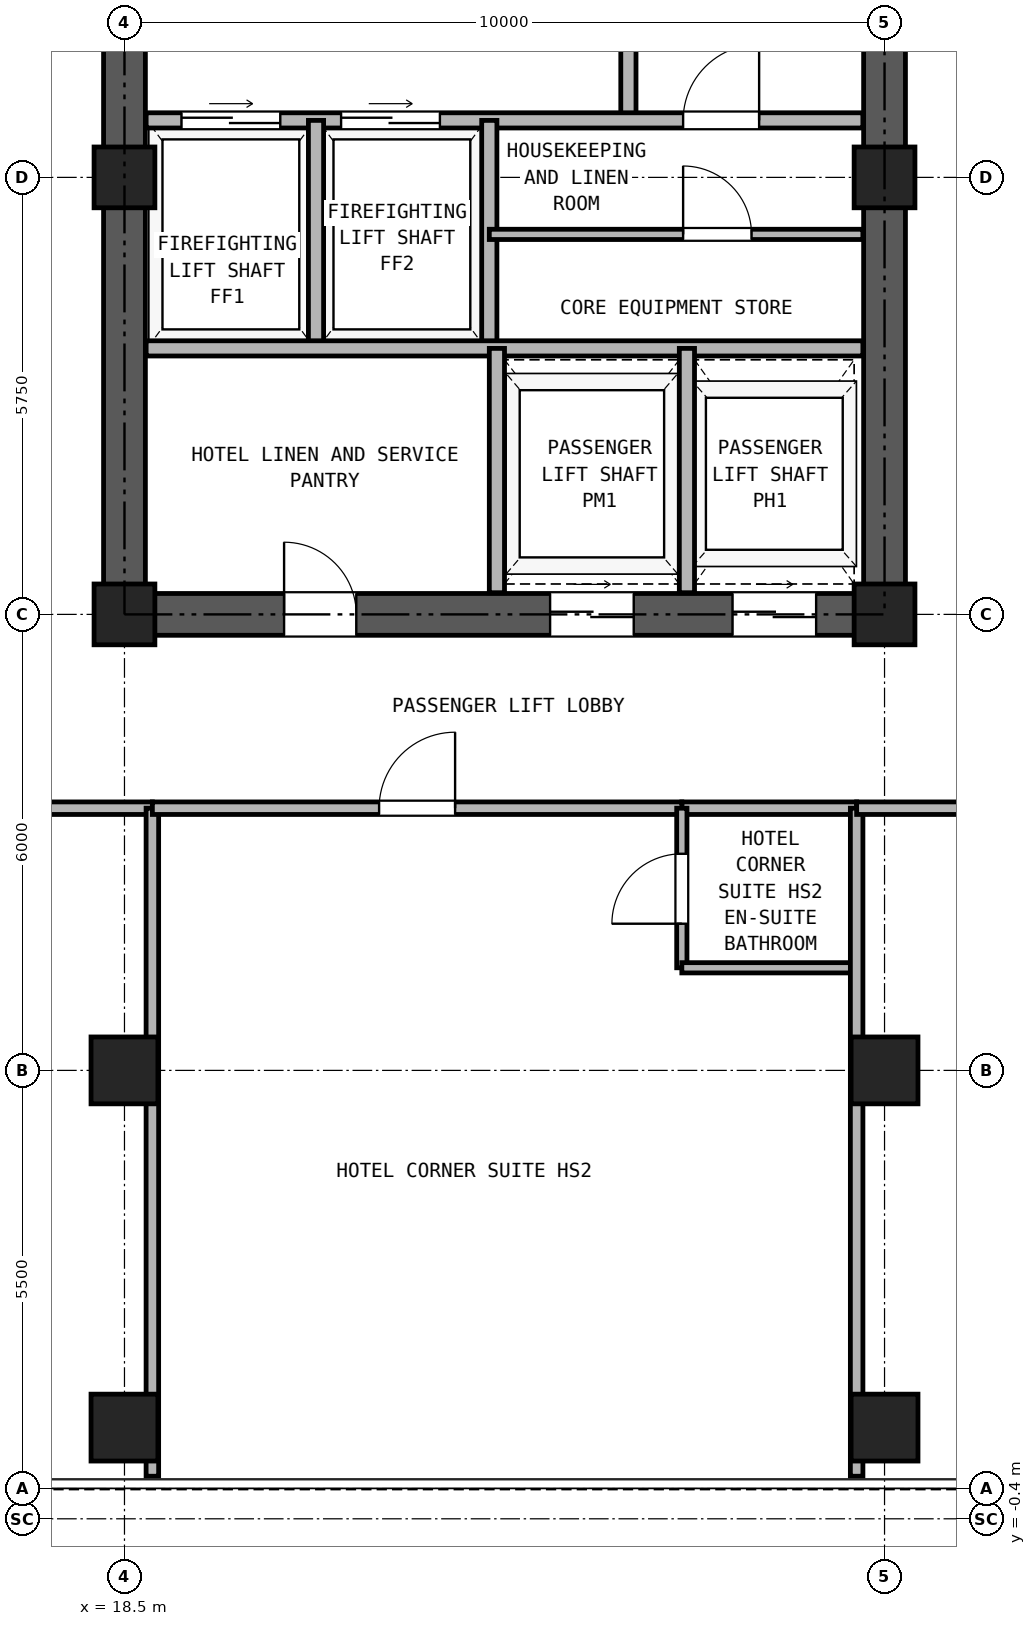
"""IFC4 building model, lengths in metres.
Left out: names, types, materials, properties, quantities, classifications, styles, units other than length and angle.
Written with IfcOpenShell. Run it as: python <this file> out.ifc"""

import sys

from ifc_helpers import new_model, si_unit, direction, frame, frame_2d, origin, origin_2d, place, context, subcontext, project, spatial, rectangle, hollow_rectangle, extrude, source, transform, mapped, element, fill, save


model = new_model("IFC4")
c1 = context("Model", 3, precision=1e-05, world=origin(), true_north=direction((0.0, 1.0)))
c2 = subcontext(c1, "Body", "Model", "MODEL_VIEW")
j1 = project(units=[si_unit("LENGTHUNIT", "METRE"), si_unit("PLANEANGLEUNIT", "RADIAN")], contexts=[c1])
p1 = place(None, origin())
s1 = spatial("IfcSite", under=j1, at=p1, CompositionType="ELEMENT")
p2 = place(p1, origin())
s2 = spatial("IfcBuilding", under=s1, at=p2, CompositionType="ELEMENT")
p3 = place(p2, frame((0.0, 0.0, 124.7)))
s3 = spatial("IfcBuildingStorey", under=s2, at=p3, CompositionType="ELEMENT", Elevation=124.7)
m1 = source(origin(), c2, "Body", "SweptSolid", [
    extrude(hollow_rectangle(XDim=0.88, YDim=0.88, WallThickness=0.05, at=origin_2d()), origin(), (0.0, 0.0, 1.0), 2.95),
])
for number, where, z_axis, x_axis in (
    (1, (18.5, 0.8, 0.0), (0.0, 0.0, 1.0), (1.0, 0.0, 0.0)),
    (2, (28.5, 0.8, 0.0), (0.0, 0.0, 1.0), (1.0, 0.0, 0.0)),
    (3, (18.5, 5.5, 0.0), (0.0, 0.0, 1.0), (1.0, 0.0, 0.0)),
):
    element("IfcColumn", number, at=place(p3, frame(where, z_axis=z_axis, x_axis=x_axis)), inside=s3, PredefinedType="COLUMN", context=c2, shape_type="MappedRepresentation", body=[
        mapped(m1, transform((0.0, 0.0, 0.0), x_axis=(1.0, 0.0, 0.0), y_axis=(0.0, 1.0, 0.0), z_axis=(0.0, 0.0, 1.0), scale=1.0)),
    ])
m2 = source(origin(), c2, "Body", "SweptSolid", [
    extrude(hollow_rectangle(XDim=0.8, YDim=0.8, WallThickness=0.045, at=origin_2d()), origin(), (0.0, 0.0, 1.0), 2.95),
])
for number, where, z_axis, x_axis in (
    (4, (18.5, 11.5, 0.0), (0.0, 0.0, 1.0), (1.0, 0.0, 0.0)),
    (5, (18.5, 17.25, 0.0), (0.0, 0.0, 1.0), (1.0, 0.0, 0.0)),
):
    element("IfcColumn", number, at=place(p3, frame(where, z_axis=z_axis, x_axis=x_axis)), inside=s3, PredefinedType="COLUMN", context=c2, shape_type="MappedRepresentation", body=[
        mapped(m2, transform((0.0, 0.0, 0.0), x_axis=(1.0, 0.0, 0.0), y_axis=(0.0, 1.0, 0.0), z_axis=(0.0, 0.0, 1.0), scale=1.0)),
    ])
p4 = place(p3, frame((28.5, 5.5, 0.0), z_axis=(0.0, 0.0, 1.0), x_axis=(1.0, 0.0, 0.0)))
e6 = element("IfcColumn", 6, at=p4, inside=s3, PredefinedType="COLUMN", context=c2, shape_type="MappedRepresentation", body=[
    mapped(m1, transform((0.0, 0.0, 0.0), x_axis=(1.0, 0.0, 0.0), y_axis=(0.0, 1.0, 0.0), z_axis=(0.0, 0.0, 1.0), scale=1.0)),
])
for number, where, z_axis, x_axis in (
    (7, (28.5, 11.5, 0.0), (0.0, 0.0, 1.0), (1.0, 0.0, 0.0)),
    (8, (28.5, 17.25, 0.0), (0.0, 0.0, 1.0), (1.0, 0.0, 0.0)),
):
    element("IfcColumn", number, at=place(p3, frame(where, z_axis=z_axis, x_axis=x_axis)), inside=s3, PredefinedType="COLUMN", context=c2, shape_type="MappedRepresentation", body=[
        mapped(m2, transform((0.0, 0.0, 0.0), x_axis=(1.0, 0.0, 0.0), y_axis=(0.0, 1.0, 0.0), z_axis=(0.0, 0.0, 1.0), scale=1.0)),
    ])
p5 = place(p3, frame((18.225, 11.5, 0.0), z_axis=(0.0, 0.0, 1.0), x_axis=(1.0, 0.0, 0.0)))
e9 = element("IfcWall", 9, at=p5, inside=s3, PredefinedType="SHEAR", context=c2, shape_type="SweptSolid", body=[
    extrude(rectangle(XDim=10.55, YDim=0.55, at=frame_2d((5.275, 0.0))), origin(), (0.0, 0.0, 1.0), 2.95),
])
p6 = place(p5, frame((2.375, 0.0, 0.0)))
e10 = element("IfcOpeningElement", 10, at=p6, cuts=e9, PredefinedType="OPENING", context=c2, shape_type="SweptSolid", body=[
    extrude(rectangle(XDim=0.95, YDim=2.15, at=frame_2d((0.475, 1.075))), frame((0.0, 0.285, 0.0), z_axis=(0.0, -1.0, 0.0), x_axis=(1.0, 0.0, 0.0)), (0.0, 0.0, 1.0), 0.57),
])
p7 = place(p5, frame((5.875, 0.0, 0.0)))
e11 = element("IfcOpeningElement", 11, at=p7, cuts=e9, PredefinedType="OPENING", context=c2, shape_type="SweptSolid", body=[
    extrude(rectangle(XDim=1.1, YDim=2.25, at=frame_2d((0.55, 1.125))), frame((0.0, 0.285, 0.0), z_axis=(0.0, -1.0, 0.0), x_axis=(1.0, 0.0, 0.0)), (0.0, 0.0, 1.0), 0.57),
])
p8 = place(p5, frame((8.275, 0.0, 0.0)))
e12 = element("IfcOpeningElement", 12, at=p8, cuts=e9, PredefinedType="OPENING", context=c2, shape_type="SweptSolid", body=[
    extrude(rectangle(XDim=1.1, YDim=2.25, at=frame_2d((0.55, 1.125))), frame((0.0, 0.285, 0.0), z_axis=(0.0, -1.0, 0.0), x_axis=(1.0, 0.0, 0.0)), (0.0, 0.0, 1.0), 0.57),
])
p9 = place(p3, frame((18.5, 11.775, 0.0), z_axis=(0.0, 0.0, 1.0), x_axis=(0.0, 1.0, 0.0)))
e13 = element("IfcWall", 13, at=p9, inside=s3, PredefinedType="SHEAR", context=c2, shape_type="SweptSolid", body=[
    extrude(rectangle(XDim=16.7, YDim=0.55, at=frame_2d((8.35, 0.0))), origin(), (0.0, 0.0, 1.0), 2.95),
])
p10 = place(p9, frame((7.375, 0.0, 0.0)))
e14 = element("IfcOpeningElement", 14, at=p10, cuts=e13, PredefinedType="OPENING", context=c2, shape_type="SweptSolid", body=[
    extrude(rectangle(XDim=1.15, YDim=2.2, at=frame_2d((0.575, 1.1))), frame((0.0, 0.285, 0.0), z_axis=(0.0, -1.0, 0.0), x_axis=(1.0, 0.0, 0.0)), (0.0, 0.0, 1.0), 0.57),
])
p11 = place(p3, frame((28.5, 11.775, 0.0), z_axis=(0.0, 0.0, 1.0), x_axis=(0.0, 1.0, 0.0)))
e15 = element("IfcWall", 15, at=p11, inside=s3, PredefinedType="SHEAR", context=c2, shape_type="SweptSolid", body=[
    extrude(rectangle(XDim=16.7, YDim=0.55, at=frame_2d((8.35, 0.0))), origin(), (0.0, 0.0, 1.0), 2.95),
])
p12 = place(p11, frame((7.375, 0.0, 0.0)))
e16 = element("IfcOpeningElement", 16, at=p12, cuts=e15, PredefinedType="OPENING", context=c2, shape_type="SweptSolid", body=[
    extrude(rectangle(XDim=1.15, YDim=2.2, at=frame_2d((0.575, 1.1))), frame((0.0, 0.285, 0.0), z_axis=(0.0, -1.0, 0.0), x_axis=(1.0, 0.0, 0.0)), (0.0, 0.0, 1.0), 0.57),
])
p13 = place(p3, frame((25.13, 18.0, 0.0), z_axis=(0.0, 0.0, 1.0), x_axis=(0.0, 1.0, 0.0)))
e17 = element("IfcWall", 17, at=p13, inside=s3, PredefinedType="PARTITIONING", context=c2, shape_type="SweptSolid", body=[
    extrude(rectangle(XDim=3.39, YDim=0.2, at=frame_2d((1.695, 0.0))), origin(), (0.0, 0.0, 1.0), 2.95),
])
p14 = place(p13, frame((1.1, 0.0, 0.0)))
e18 = element("IfcOpeningElement", 18, at=p14, cuts=e17, PredefinedType="OPENING", context=c2, shape_type="SweptSolid", body=[
    extrude(rectangle(XDim=1.15, YDim=2.2, at=frame_2d((0.575, 1.1))), frame((0.0, 0.11, 0.0), z_axis=(0.0, -1.0, 0.0), x_axis=(1.0, 0.0, 0.0)), (0.0, 0.0, 1.0), 0.22),
])
p15 = place(p3, frame((18.785, 18.0, 0.0), z_axis=(0.0, 0.0, 1.0), x_axis=(1.0, 0.0, 0.0)))
e19 = element("IfcWall", 19, at=p15, inside=s3, PredefinedType="PARTITIONING", context=c2, shape_type="SweptSolid", body=[
    extrude(rectangle(XDim=9.43, YDim=0.2, at=frame_2d((4.715, 0.0))), origin(), (0.0, 0.0, 1.0), 2.95),
])
p16 = place(p15, frame((0.465, 0.0, 0.0)))
e20 = element("IfcOpeningElement", 20, at=p16, cuts=e19, PredefinedType="OPENING", context=c2, shape_type="SweptSolid", body=[
    extrude(rectangle(XDim=1.3, YDim=2.3, at=frame_2d((0.65, 1.15))), frame((0.0, 0.11, 0.0), z_axis=(0.0, -1.0, 0.0), x_axis=(1.0, 0.0, 0.0)), (0.0, 0.0, 1.0), 0.22),
])
p17 = place(p15, frame((2.565, 0.0, 0.0)))
e21 = element("IfcOpeningElement", 21, at=p17, cuts=e19, PredefinedType="OPENING", context=c2, shape_type="SweptSolid", body=[
    extrude(rectangle(XDim=1.3, YDim=2.3, at=frame_2d((0.65, 1.15))), frame((0.0, 0.11, 0.0), z_axis=(0.0, -1.0, 0.0), x_axis=(1.0, 0.0, 0.0)), (0.0, 0.0, 1.0), 0.22),
])
p18 = place(p15, frame((7.065, 0.0, 0.0)))
e22 = element("IfcOpeningElement", 22, at=p18, cuts=e19, PredefinedType="OPENING", context=c2, shape_type="SweptSolid", body=[
    extrude(rectangle(XDim=1.0, YDim=2.15, at=frame_2d((0.5, 1.075))), frame((0.0, 0.11, 0.0), z_axis=(0.0, -1.0, 0.0), x_axis=(1.0, 0.0, 0.0)), (0.0, 0.0, 1.0), 0.22),
])
for number, where, z_axis, x_axis in (
    (23, (21.02, 15.0, 0.0), (0.0, 0.0, 1.0), (0.0, 1.0, 0.0)),
    (24, (23.3, 15.0, 0.0), (0.0, 0.0, 1.0), (0.0, 1.0, 0.0)),
):
    element("IfcWall", number, at=place(p3, frame(where, z_axis=z_axis, x_axis=x_axis)), inside=s3, PredefinedType="PARTITIONING", context=c2, shape_type="SweptSolid", body=[
        extrude(rectangle(XDim=3.0, YDim=0.2, at=frame_2d((1.5, 0.0))), origin(), (0.0, 0.0, 1.0), 2.95),
    ])
p19 = place(p3, frame((18.785, 15.0, 0.0), z_axis=(0.0, 0.0, 1.0), x_axis=(1.0, 0.0, 0.0)))
e25 = element("IfcWall", 25, at=p19, inside=s3, PredefinedType="PARTITIONING", context=c2, shape_type="SweptSolid", body=[
    extrude(rectangle(XDim=9.43, YDim=0.2, at=frame_2d((4.715, 0.0))), origin(), (0.0, 0.0, 1.0), 2.95),
])
p20 = place(p3, frame((23.3, 16.5, 0.0), z_axis=(0.0, 0.0, 1.0), x_axis=(1.0, 0.0, 0.0)))
e26 = element("IfcWall", 26, at=p20, inside=s3, PredefinedType="PARTITIONING", context=c2, shape_type="SweptSolid", body=[
    extrude(rectangle(XDim=4.915, YDim=0.135, at=frame_2d((2.458, 0.0))), origin(), (0.0, 0.0, 1.0), 2.95),
])
p21 = place(p20, frame((2.55, 0.0, 0.0)))
e27 = element("IfcOpeningElement", 27, at=p21, cuts=e26, PredefinedType="OPENING", context=c2, shape_type="SweptSolid", body=[
    extrude(rectangle(XDim=0.9, YDim=2.05, at=frame_2d((0.45, 1.025))), frame((0.0, 0.077, 0.0), z_axis=(0.0, -1.0, 0.0), x_axis=(1.0, 0.0, 0.0)), (0.0, 0.0, 1.0), 0.155),
])
for number, where, z_axis, x_axis in (
    (28, (23.4, 11.785, 0.0), (0.0, 0.0, 1.0), (0.0, 1.0, 0.0)),
    (29, (25.9, 11.785, 0.0), (0.0, 0.0, 1.0), (0.0, 1.0, 0.0)),
):
    element("IfcWall", number, at=place(p3, frame(where, z_axis=z_axis, x_axis=x_axis)), inside=s3, PredefinedType="PARTITIONING", context=c2, shape_type="SweptSolid", body=[
        extrude(rectangle(XDim=3.215, YDim=0.2, at=frame_2d((1.607, 0.0))), origin(), (0.0, 0.0, 1.0), 2.95),
    ])
p22 = place(p3, frame((11.9, 8.95, 0.0), z_axis=(0.0, 0.0, 1.0), x_axis=(1.0, 0.0, 0.0)))
e30 = element("IfcWall", 30, at=p22, inside=s3, PredefinedType="PARTITIONING", context=c2, shape_type="SweptSolid", body=[
    extrude(rectangle(XDim=6.967, YDim=0.165, at=frame_2d((3.483, 0.0))), origin(), (0.0, 0.0, 1.0), 2.95),
])
p23 = place(p22, frame((2.983, 0.0, 0.0)))
e31 = element("IfcOpeningElement", 31, at=p23, cuts=e30, PredefinedType="OPENING", context=c2, shape_type="SweptSolid", body=[
    extrude(rectangle(XDim=1.0, YDim=2.15, at=frame_2d((0.5, 1.075))), frame((0.0, 0.093, 0.0), z_axis=(0.0, -1.0, 0.0), x_axis=(1.0, 0.0, 0.0)), (0.0, 0.0, 1.0), 0.185),
])
p24 = place(p3, frame((18.867, 0.16, 0.0), z_axis=(0.0, 0.0, 1.0), x_axis=(0.0, 1.0, 0.0)))
e32 = element("IfcWall", 32, at=p24, inside=s3, PredefinedType="PARTITIONING", context=c2, shape_type="SweptSolid", body=[
    extrude(rectangle(XDim=8.79, YDim=0.165, at=frame_2d((4.395, 0.0))), origin(), (0.0, 0.0, 1.0), 2.95),
])
p25 = place(p3, frame((25.833, 8.95, 0.0), z_axis=(0.0, 0.0, 1.0), x_axis=(1.0, 0.0, 0.0)))
e33 = element("IfcWall", 33, at=p25, inside=s3, PredefinedType="PARTITIONING", context=c2, shape_type="SweptSolid", body=[
    extrude(rectangle(XDim=2.3, YDim=0.165, at=frame_2d((1.15, 0.0))), origin(), (0.0, 0.0, 1.0), 2.95),
])
p26 = place(p3, frame((18.867, 8.95, 0.0), z_axis=(0.0, 0.0, 1.0), x_axis=(1.0, 0.0, 0.0)))
e34 = element("IfcWall", 34, at=p26, inside=s3, PredefinedType="PARTITIONING", context=c2, shape_type="SweptSolid", body=[
    extrude(rectangle(XDim=6.966, YDim=0.165, at=frame_2d((3.483, 0.0))), origin(), (0.0, 0.0, 1.0), 2.95),
])
p27 = place(p26, frame((2.983, 0.0, 0.0)))
e35 = element("IfcOpeningElement", 35, at=p27, cuts=e34, PredefinedType="OPENING", context=c2, shape_type="SweptSolid", body=[
    extrude(rectangle(XDim=1.0, YDim=2.15, at=frame_2d((0.5, 1.075))), frame((0.0, 0.093, 0.0), z_axis=(0.0, -1.0, 0.0), x_axis=(1.0, 0.0, 0.0)), (0.0, 0.0, 1.0), 0.185),
])
p28 = place(p3, frame((25.833, 6.85, 0.0), z_axis=(0.0, 0.0, 1.0), x_axis=(0.0, 1.0, 0.0)))
e36 = element("IfcWall", 36, at=p28, inside=s3, PredefinedType="PARTITIONING", context=c2, shape_type="SweptSolid", body=[
    extrude(rectangle(XDim=2.1, YDim=0.135, at=frame_2d((1.05, 0.0))), origin(), (0.0, 0.0, 1.0), 2.95),
])
p29 = place(p28, frame((0.58, 0.0, 0.0)))
e37 = element("IfcOpeningElement", 37, at=p29, cuts=e36, PredefinedType="OPENING", context=c2, shape_type="SweptSolid", body=[
    extrude(rectangle(XDim=0.92, YDim=2.1, at=frame_2d((0.46, 1.05))), frame((0.0, 0.077, 0.0), z_axis=(0.0, -1.0, 0.0), x_axis=(1.0, 0.0, 0.0)), (0.0, 0.0, 1.0), 0.155),
])
p30 = place(p3, frame((25.833, 6.85, 0.0), z_axis=(0.0, 0.0, 1.0), x_axis=(1.0, 0.0, 0.0)))
e38 = element("IfcWall", 38, at=p30, inside=s3, PredefinedType="PARTITIONING", context=c2, shape_type="SweptSolid", body=[
    extrude(rectangle(XDim=2.3, YDim=0.135, at=frame_2d((1.15, 0.0))), origin(), (0.0, 0.0, 1.0), 2.95),
])
p31 = place(p3, frame((28.133, 0.16, 0.0), z_axis=(0.0, 0.0, 1.0), x_axis=(0.0, 1.0, 0.0)))
e39 = element("IfcWall", 39, at=p31, inside=s3, PredefinedType="PARTITIONING", context=c2, shape_type="SweptSolid", body=[
    extrude(rectangle(XDim=8.79, YDim=0.165, at=frame_2d((4.395, 0.0))), origin(), (0.0, 0.0, 1.0), 2.95),
])
p32 = place(p3, frame((28.133, 8.95, 0.0), z_axis=(0.0, 0.0, 1.0), x_axis=(1.0, 0.0, 0.0)))
e40 = element("IfcWall", 40, at=p32, inside=s3, PredefinedType="PARTITIONING", context=c2, shape_type="SweptSolid", body=[
    extrude(rectangle(XDim=6.967, YDim=0.165, at=frame_2d((3.483, 0.0))), origin(), (0.0, 0.0, 1.0), 2.95),
])
p33 = place(p32, frame((2.984, 0.0, 0.0)))
e41 = element("IfcOpeningElement", 41, at=p33, cuts=e40, PredefinedType="OPENING", context=c2, shape_type="SweptSolid", body=[
    extrude(rectangle(XDim=1.0, YDim=2.15, at=frame_2d((0.5, 1.075))), frame((0.0, 0.093, 0.0), z_axis=(0.0, -1.0, 0.0), x_axis=(1.0, 0.0, 0.0)), (0.0, 0.0, 1.0), 0.185),
])
p34 = place(p16, origin())
e42 = element("IfcDoor", 42, at=p34, inside=s3, OperationType="DOUBLE_DOOR_SLIDING", PredefinedType="DOOR", context=c2, shape_type="SweptSolid", body=[
    extrude(rectangle(XDim=1.3, YDim=2.3, at=frame_2d((0.65, 1.15))), frame((0.0, 0.025, 0.0), z_axis=(0.0, -1.0, 0.0), x_axis=(1.0, 0.0, 0.0)), (0.0, 0.0, 1.0), 0.05),
])
fill(e20, e42)
p35 = place(p17, origin())
e43 = element("IfcDoor", 43, at=p35, inside=s3, OperationType="DOUBLE_DOOR_SLIDING", PredefinedType="DOOR", context=c2, shape_type="SweptSolid", body=[
    extrude(rectangle(XDim=1.3, YDim=2.3, at=frame_2d((0.65, 1.15))), frame((0.0, 0.025, 0.0), z_axis=(0.0, -1.0, 0.0), x_axis=(1.0, 0.0, 0.0)), (0.0, 0.0, 1.0), 0.05),
])
fill(e21, e43)
p36 = place(p18, frame((1.0, 0.0, 0.0), z_axis=(0.0, 0.0, 1.0), x_axis=(-1.0, 0.0, 0.0)))
e44 = element("IfcDoor", 44, at=p36, inside=s3, OperationType="SINGLE_SWING_RIGHT", PredefinedType="DOOR", context=c2, shape_type="SweptSolid", body=[
    extrude(rectangle(XDim=1.0, YDim=2.15, at=frame_2d((0.5, 1.075))), frame((0.0, 0.025, 0.0), z_axis=(0.0, -1.0, 0.0), x_axis=(1.0, 0.0, 0.0)), (0.0, 0.0, 1.0), 0.05),
])
fill(e22, e44)
p37 = place(p21, frame((0.9, 0.0, 0.0), z_axis=(0.0, 0.0, 1.0), x_axis=(-1.0, 0.0, 0.0)))
e45 = element("IfcDoor", 45, at=p37, inside=s3, OperationType="SINGLE_SWING_LEFT", PredefinedType="DOOR", context=c2, shape_type="SweptSolid", body=[
    extrude(rectangle(XDim=0.9, YDim=2.05, at=frame_2d((0.45, 1.025))), frame((0.0, 0.025, 0.0), z_axis=(0.0, -1.0, 0.0), x_axis=(1.0, 0.0, 0.0)), (0.0, 0.0, 1.0), 0.05),
])
fill(e27, e45)
p38 = place(p6, frame((0.95, 0.0, 0.0), z_axis=(0.0, 0.0, 1.0), x_axis=(-1.0, 0.0, 0.0)))
e46 = element("IfcDoor", 46, at=p38, inside=s3, OperationType="SINGLE_SWING_LEFT", PredefinedType="DOOR", context=c2, shape_type="SweptSolid", body=[
    extrude(rectangle(XDim=0.95, YDim=2.15, at=frame_2d((0.475, 1.075))), frame((0.0, 0.025, 0.0), z_axis=(0.0, -1.0, 0.0), x_axis=(1.0, 0.0, 0.0)), (0.0, 0.0, 1.0), 0.05),
])
fill(e10, e46)
p39 = place(p7, frame((1.1, 0.0, 0.0), z_axis=(0.0, 0.0, 1.0), x_axis=(-1.0, 0.0, 0.0)))
e47 = element("IfcDoor", 47, at=p39, inside=s3, OperationType="DOUBLE_DOOR_SLIDING", PredefinedType="DOOR", context=c2, shape_type="SweptSolid", body=[
    extrude(rectangle(XDim=1.1, YDim=2.25, at=frame_2d((0.55, 1.125))), frame((0.0, 0.025, 0.0), z_axis=(0.0, -1.0, 0.0), x_axis=(1.0, 0.0, 0.0)), (0.0, 0.0, 1.0), 0.05),
])
fill(e11, e47)
p40 = place(p8, frame((1.1, 0.0, 0.0), z_axis=(0.0, 0.0, 1.0), x_axis=(-1.0, 0.0, 0.0)))
e48 = element("IfcDoor", 48, at=p40, inside=s3, OperationType="DOUBLE_DOOR_SLIDING", PredefinedType="DOOR", context=c2, shape_type="SweptSolid", body=[
    extrude(rectangle(XDim=1.1, YDim=2.25, at=frame_2d((0.55, 1.125))), frame((0.0, 0.025, 0.0), z_axis=(0.0, -1.0, 0.0), x_axis=(1.0, 0.0, 0.0)), (0.0, 0.0, 1.0), 0.05),
])
fill(e12, e48)
p41 = place(p29, origin())
e49 = element("IfcDoor", 49, at=p41, inside=s3, OperationType="SINGLE_SWING_LEFT", PredefinedType="DOOR", context=c2, shape_type="SweptSolid", body=[
    extrude(rectangle(XDim=0.92, YDim=2.1, at=frame_2d((0.46, 1.05))), frame((0.0, 0.025, 0.0), z_axis=(0.0, -1.0, 0.0), x_axis=(1.0, 0.0, 0.0)), (0.0, 0.0, 1.0), 0.05),
])
fill(e37, e49)
p42 = place(p27, frame((1.0, 0.0, 0.0), z_axis=(0.0, 0.0, 1.0), x_axis=(-1.0, 0.0, 0.0)))
e50 = element("IfcDoor", 50, at=p42, inside=s3, OperationType="SINGLE_SWING_RIGHT", PredefinedType="DOOR", context=c2, shape_type="SweptSolid", body=[
    extrude(rectangle(XDim=1.0, YDim=2.15, at=frame_2d((0.5, 1.075))), frame((0.0, 0.025, 0.0), z_axis=(0.0, -1.0, 0.0), x_axis=(1.0, 0.0, 0.0)), (0.0, 0.0, 1.0), 0.05),
])
fill(e35, e50)
save(model, sys.argv[1])
